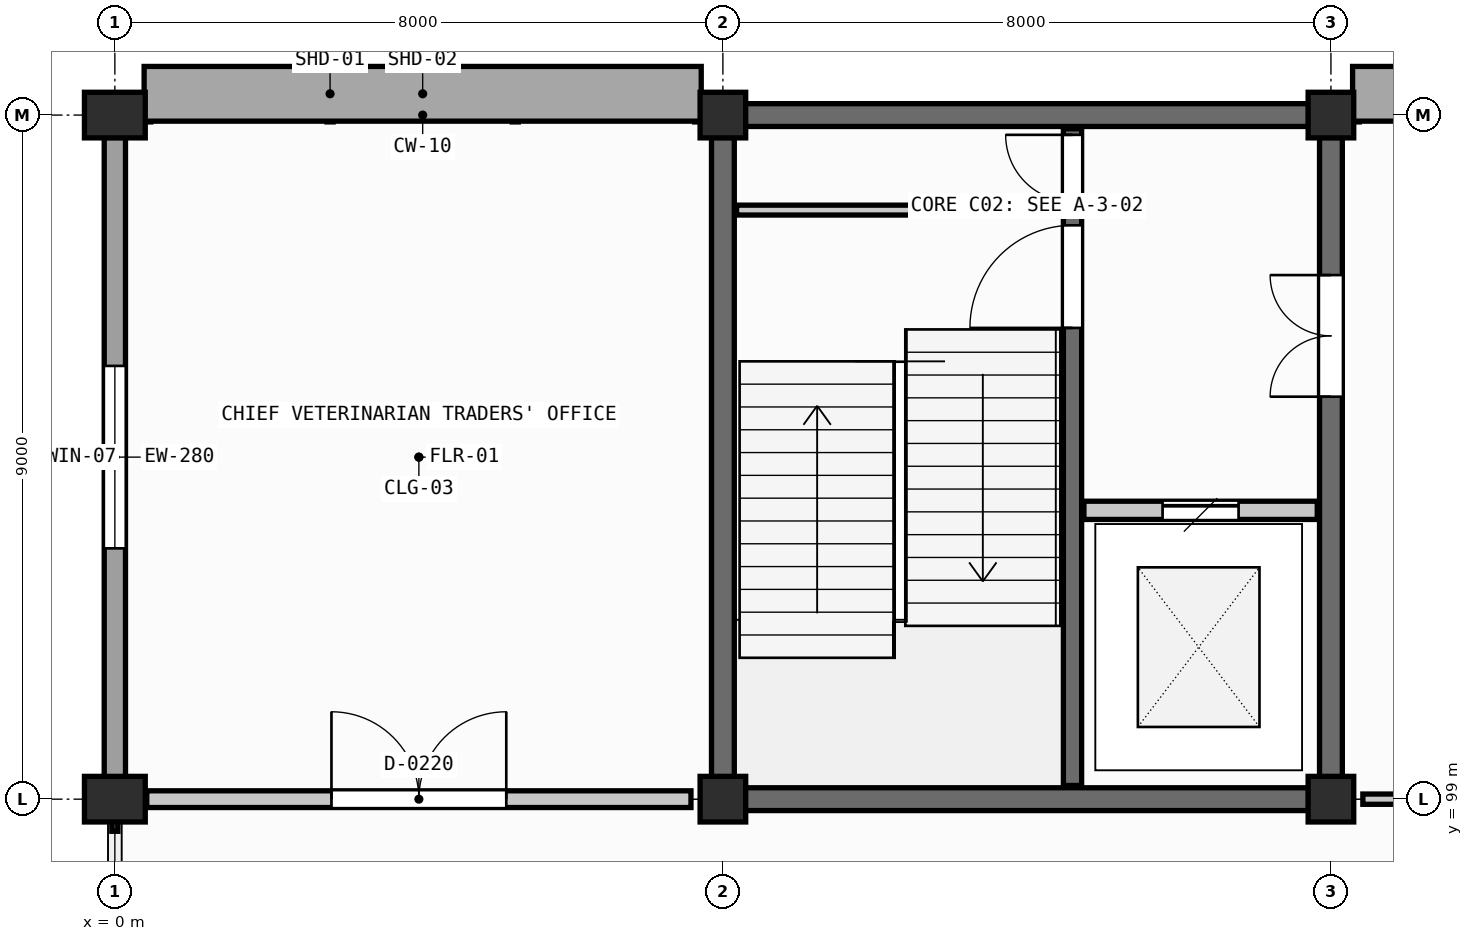
"""IFC4 building model, lengths in metres.
Left out: names, types, materials, properties, quantities, classifications, styles, units other than length and angle.
Written with IfcOpenShell. Run it as: python <this file> out.ifc"""

import sys

from ifc_helpers import new_model, si_unit, direction, frame, frame_2d, origin, origin_2d, place, context, subcontext, project, spatial, rectangle, extrude, element, fill, save


model = new_model("IFC4")
c1 = context("Model", 3, precision=1e-05, world=origin(), true_north=direction((0.0, 1.0)))
c2 = subcontext(c1, "Body", "Model", "MODEL_VIEW")
j1 = project(units=[si_unit("LENGTHUNIT", "METRE"), si_unit("PLANEANGLEUNIT", "RADIAN")], contexts=[c1])
p1 = place(None, origin())
s1 = spatial("IfcSite", under=j1, at=p1, CompositionType="ELEMENT")
p2 = place(p1, origin())
s2 = spatial("IfcBuilding", under=s1, at=p2, CompositionType="ELEMENT")
p3 = place(p2, frame((0.0, 0.0, 4.8)))
s3 = spatial("IfcBuildingStorey", under=s2, at=p3, CompositionType="ELEMENT", Elevation=4.8)
for number, where, z_axis, x_axis in (
    (1, (0.0, 99.0, 0.0), (0.0, 0.0, 1.0), (1.0, 0.0, 0.0)),
    (2, (0.0, 108.0, 0.0), (0.0, 0.0, 1.0), (1.0, 0.0, 0.0)),
):
    element("IfcColumn", number, at=place(p3, frame(where, z_axis=z_axis, x_axis=x_axis)), inside=s3, PredefinedType="COLUMN", context=c2, shape_type="SweptSolid", body=[
        extrude(rectangle(XDim=0.8, YDim=0.6, at=origin_2d()), origin(), (0.0, 0.0, 1.0), 4.2),
    ])
for number, where, z_axis, x_axis in (
    (3, (8.0, 99.0, 0.0), (0.0, 0.0, 1.0), (1.0, 0.0, 0.0)),
    (4, (8.0, 108.0, 0.0), (0.0, 0.0, 1.0), (1.0, 0.0, 0.0)),
    (5, (16.0, 99.0, 0.0), (0.0, 0.0, 1.0), (1.0, 0.0, 0.0)),
    (6, (16.0, 108.0, 0.0), (0.0, 0.0, 1.0), (1.0, 0.0, 0.0)),
):
    element("IfcColumn", number, at=place(p3, frame(where, z_axis=z_axis, x_axis=x_axis)), inside=s3, PredefinedType="COLUMN", context=c2, shape_type="SweptSolid", body=[
        extrude(rectangle(XDim=0.6, YDim=0.6, at=origin_2d()), origin(), (0.0, 0.0, 1.0), 4.2),
    ])
p4 = place(p3, frame((0.0, 107.705, 0.0), z_axis=(0.0, 0.0, 1.0), x_axis=(0.0, -1.0, 0.0)))
e7 = element("IfcWall", 7, at=p4, inside=s3, PredefinedType="SOLIDWALL", context=c2, shape_type="SweptSolid", body=[
    extrude(rectangle(XDim=8.41, YDim=0.28, at=frame_2d((4.205, 0.0))), origin(), (0.0, 0.0, 1.0), 3.05),
])
p5 = place(p4, frame((3.005, 0.0, 1.0)))
e8 = element("IfcOpeningElement", 8, at=p5, cuts=e7, PredefinedType="OPENING", context=c2, shape_type="SweptSolid", body=[
    extrude(rectangle(XDim=2.4, YDim=1.55, at=frame_2d((1.2, 0.775))), frame((0.0, 0.15, 0.0), z_axis=(0.0, -1.0, 0.0), x_axis=(1.0, 0.0, 0.0)), (0.0, 0.0, 1.0), 0.3),
])
for number, where, z_axis, x_axis in (
    (9, (8.295, 99.0, 0.0), (0.0, 0.0, 1.0), (1.0, 0.0, 0.0)),
    (10, (8.295, 108.0, 0.0), (0.0, 0.0, 1.0), (1.0, 0.0, 0.0)),
):
    element("IfcWall", number, at=place(p3, frame(where, z_axis=z_axis, x_axis=x_axis)), inside=s3, PredefinedType="SHEAR", context=c2, shape_type="SweptSolid", body=[
        extrude(rectangle(XDim=7.41, YDim=0.3, at=frame_2d((3.705, 0.0))), origin(), (0.0, 0.0, 1.0), 3.935),
    ])
p6 = place(p3, frame((8.0, 99.295, 0.0), z_axis=(0.0, 0.0, 1.0), x_axis=(0.0, 1.0, 0.0)))
e11 = element("IfcWall", 11, at=p6, inside=s3, PredefinedType="SHEAR", context=c2, shape_type="SweptSolid", body=[
    extrude(rectangle(XDim=8.41, YDim=0.3, at=frame_2d((4.205, 0.0))), origin(), (0.0, 0.0, 1.0), 3.935),
])
p7 = place(p3, frame((16.0, 99.295, 0.0), z_axis=(0.0, 0.0, 1.0), x_axis=(0.0, 1.0, 0.0)))
e12 = element("IfcWall", 12, at=p7, inside=s3, PredefinedType="SHEAR", context=c2, shape_type="SweptSolid", body=[
    extrude(rectangle(XDim=8.41, YDim=0.3, at=frame_2d((4.205, 0.0))), origin(), (0.0, 0.0, 1.0), 3.935),
])
p8 = place(p7, frame((5.0, 0.0, 0.0)))
e13 = element("IfcOpeningElement", 13, at=p8, cuts=e12, PredefinedType="OPENING", context=c2, shape_type="SweptSolid", body=[
    extrude(rectangle(XDim=1.6, YDim=2.2, at=frame_2d((0.8, 1.1))), frame((0.0, 0.16, 0.0), z_axis=(0.0, -1.0, 0.0), x_axis=(1.0, 0.0, 0.0)), (0.0, 0.0, 1.0), 0.32),
])
p9 = place(p3, frame((12.6, 99.18, 0.0), z_axis=(0.0, 0.0, 1.0), x_axis=(0.0, 1.0, 0.0)))
e14 = element("IfcWall", 14, at=p9, inside=s3, PredefinedType="SHEAR", context=c2, shape_type="SweptSolid", body=[
    extrude(rectangle(XDim=8.64, YDim=0.24, at=frame_2d((4.32, 0.0))), origin(), (0.0, 0.0, 1.0), 3.935),
])
p10 = place(p9, frame((6.02, 0.0, 0.0)))
e15 = element("IfcOpeningElement", 15, at=p10, cuts=e14, PredefinedType="OPENING", context=c2, shape_type="SweptSolid", body=[
    extrude(rectangle(XDim=1.35, YDim=2.2, at=frame_2d((0.675, 1.1))), frame((0.0, 0.13, 0.0), z_axis=(0.0, -1.0, 0.0), x_axis=(1.0, 0.0, 0.0)), (0.0, 0.0, 1.0), 0.26),
])
p11 = place(p9, frame((7.68, 0.0, 0.0)))
e16 = element("IfcOpeningElement", 16, at=p11, cuts=e14, PredefinedType="OPENING", context=c2, shape_type="SweptSolid", body=[
    extrude(rectangle(XDim=0.88, YDim=2.02, at=frame_2d((0.44, 1.01))), frame((0.0, 0.13, 0.0), z_axis=(0.0, -1.0, 0.0), x_axis=(1.0, 0.0, 0.0)), (0.0, 0.0, 1.0), 0.26),
])
p12 = place(p3, frame((8.18, 106.75, 0.0), z_axis=(0.0, 0.0, 1.0), x_axis=(1.0, 0.0, 0.0)))
e17 = element("IfcWall", 17, at=p12, inside=s3, PredefinedType="PARTITIONING", context=c2, shape_type="SweptSolid", body=[
    extrude(rectangle(XDim=4.28, YDim=0.13, at=frame_2d((2.14, 0.0))), origin(), (0.0, 0.0, 1.0), 3.285),
])
p13 = place(p3, frame((12.75, 102.8, 0.0), z_axis=(0.0, 0.0, 1.0), x_axis=(1.0, 0.0, 0.0)))
e18 = element("IfcWall", 18, at=p13, inside=s3, PredefinedType="SHEAR", context=c2, shape_type="SweptSolid", body=[
    extrude(rectangle(XDim=3.07, YDim=0.24, at=frame_2d((1.535, 0.0))), origin(), (0.0, 0.0, 1.0), 3.285),
])
p14 = place(p13, frame((1.035, 0.0, 0.0)))
e19 = element("IfcOpeningElement", 19, at=p14, cuts=e18, PredefinedType="OPENING", context=c2, shape_type="SweptSolid", body=[
    extrude(rectangle(XDim=1.0, YDim=2.15, at=frame_2d((0.5, 1.075))), frame((0.0, 0.13, 0.0), z_axis=(0.0, -1.0, 0.0), x_axis=(1.0, 0.0, 0.0)), (0.0, 0.0, 1.0), 0.26),
])
p15 = place(p3, frame((0.42, 99.0, 0.0), z_axis=(0.0, 0.0, 1.0), x_axis=(1.0, 0.0, 0.0)))
e20 = element("IfcWall", 20, at=p15, inside=s3, PredefinedType="SOLIDWALL", context=c2, shape_type="SweptSolid", body=[
    extrude(rectangle(XDim=7.16, YDim=0.22, at=frame_2d((3.58, 0.0))), origin(), (0.0, 0.0, 1.0), 3.05),
])
p16 = place(p15, frame((2.43, 0.0, 0.0)))
e21 = element("IfcOpeningElement", 21, at=p16, cuts=e20, PredefinedType="OPENING", context=c2, shape_type="SweptSolid", body=[
    extrude(rectangle(XDim=2.3, YDim=2.5, at=frame_2d((1.15, 1.25))), frame((0.0, 0.12, 0.0), z_axis=(0.0, -1.0, 0.0), x_axis=(1.0, 0.0, 0.0)), (0.0, 0.0, 1.0), 0.24),
])
p17 = place(p3, frame((16.42, 99.0, 0.0), z_axis=(0.0, 0.0, 1.0), x_axis=(1.0, 0.0, 0.0)))
e22 = element("IfcWall", 22, at=p17, inside=s3, PredefinedType="PLUMBINGWALL", context=c2, shape_type="SweptSolid", body=[
    extrude(rectangle(XDim=3.52, YDim=0.135, at=frame_2d((1.76, 0.0))), origin(), (0.0, 0.0, 1.0), 3.05),
])
p18 = place(p17, frame((1.285, 0.0, 0.0)))
e23 = element("IfcOpeningElement", 23, at=p18, cuts=e22, PredefinedType="OPENING", context=c2, shape_type="SweptSolid", body=[
    extrude(rectangle(XDim=0.95, YDim=2.1, at=frame_2d((0.475, 1.05))), frame((0.0, 0.078, 0.0), z_axis=(0.0, -1.0, 0.0), x_axis=(1.0, 0.0, 0.0)), (0.0, 0.0, 1.0), 0.155),
])
p19 = place(p5, origin())
e24 = element("IfcWindow", 24, at=p19, inside=s3, PartitioningType="SINGLE_PANEL", PredefinedType="WINDOW", context=c2, shape_type="SweptSolid", body=[
    extrude(rectangle(XDim=2.4, YDim=1.55, at=frame_2d((1.2, 0.775))), frame((0.0, 0.03, 0.0), z_axis=(0.0, -1.0, 0.0), x_axis=(1.0, 0.0, 0.0)), (0.0, 0.0, 1.0), 0.06),
])
fill(e8, e24)
p20 = place(p10, origin())
e25 = element("IfcDoor", 25, at=p20, inside=s3, OperationType="SINGLE_SWING_LEFT", PredefinedType="DOOR", context=c2, shape_type="SweptSolid", body=[
    extrude(rectangle(XDim=1.35, YDim=2.2, at=frame_2d((0.675, 1.1))), frame((0.0, 0.025, 0.0), z_axis=(0.0, -1.0, 0.0), x_axis=(1.0, 0.0, 0.0)), (0.0, 0.0, 1.0), 0.05),
])
fill(e15, e25)
p21 = place(p11, origin())
e26 = element("IfcDoor", 26, at=p21, inside=s3, OperationType="SINGLE_SWING_RIGHT", PredefinedType="DOOR", context=c2, shape_type="SweptSolid", body=[
    extrude(rectangle(XDim=0.88, YDim=2.02, at=frame_2d((0.44, 1.01))), frame((0.0, 0.025, 0.0), z_axis=(0.0, -1.0, 0.0), x_axis=(1.0, 0.0, 0.0)), (0.0, 0.0, 1.0), 0.05),
])
fill(e16, e26)
p22 = place(p8, origin())
e27 = element("IfcDoor", 27, at=p22, inside=s3, OperationType="DOUBLE_DOOR_SINGLE_SWING", PredefinedType="DOOR", context=c2, shape_type="SweptSolid", body=[
    extrude(rectangle(XDim=1.6, YDim=2.2, at=frame_2d((0.8, 1.1))), frame((0.0, 0.025, 0.0), z_axis=(0.0, -1.0, 0.0), x_axis=(1.0, 0.0, 0.0)), (0.0, 0.0, 1.0), 0.05),
])
fill(e13, e27)
p23 = place(p14, origin())
e28 = element("IfcDoor", 28, at=p23, inside=s3, OperationType="SLIDING_TO_LEFT", PredefinedType="DOOR", context=c2, shape_type="SweptSolid", body=[
    extrude(rectangle(XDim=1.0, YDim=2.15, at=frame_2d((0.5, 1.075))), frame((0.0, 0.025, 0.0), z_axis=(0.0, -1.0, 0.0), x_axis=(1.0, 0.0, 0.0)), (0.0, 0.0, 1.0), 0.05),
])
fill(e19, e28)
p24 = place(p16, origin())
e29 = element("IfcDoor", 29, at=p24, inside=s3, OperationType="DOUBLE_DOOR_SINGLE_SWING", PredefinedType="DOOR", context=c2, shape_type="SweptSolid", body=[
    extrude(rectangle(XDim=2.3, YDim=2.5, at=frame_2d((1.15, 1.25))), frame((0.0, 0.025, 0.0), z_axis=(0.0, -1.0, 0.0), x_axis=(1.0, 0.0, 0.0)), (0.0, 0.0, 1.0), 0.05),
])
fill(e21, e29)
save(model, sys.argv[1])
